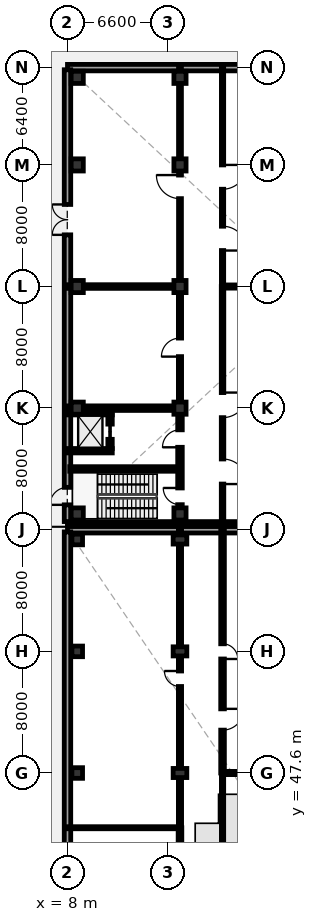
"""IFC4 building model, lengths in metres.
Left out: names, types, materials, properties, quantities, classifications, styles, units other than length and angle.
Written with IfcOpenShell. Run it as: python <this file> out.ifc"""

import sys

from ifc_helpers import new_model, si_unit, direction, frame, frame_2d, origin, origin_2d, place, context, subcontext, project, spatial, rectangle, extrude, element, fill, save


model = new_model("IFC4")
c1 = context("Model", 3, precision=1e-05, world=origin(), true_north=direction((0.0, 1.0)))
c2 = subcontext(c1, "Body", "Model", "MODEL_VIEW")
j1 = project(units=[si_unit("LENGTHUNIT", "METRE"), si_unit("PLANEANGLEUNIT", "RADIAN")], contexts=[c1])
p1 = place(None, origin())
s1 = spatial("IfcSite", under=j1, at=p1, CompositionType="ELEMENT")
p2 = place(p1, origin())
s2 = spatial("IfcBuilding", under=s1, at=p2, CompositionType="ELEMENT")
p3 = place(p2, origin())
s3 = spatial("IfcBuildingStorey", under=s2, at=p3, CompositionType="ELEMENT", Elevation=0.0)
for number, where, z_axis, x_axis in (
    (1, (8.64, 47.6, 0.0), (0.0, 0.0, 1.0), (1.0, 0.0, 0.0)),
    (2, (8.64, 55.6, 0.0), (0.0, 0.0, 1.0), (1.0, 0.0, 0.0)),
    (3, (8.64, 62.96, 0.0), (0.0, 0.0, 1.0), (1.0, 0.0, 0.0)),
):
    element("IfcColumn", number, at=place(p3, frame(where, z_axis=z_axis, x_axis=x_axis)), inside=s3, PredefinedType="COLUMN", context=c2, shape_type="SweptSolid", body=[
        extrude(rectangle(XDim=0.7, YDim=0.7, at=origin_2d()), origin(), (0.0, 0.0, 1.0), 5.4),
    ])
for number, where, z_axis, x_axis in (
    (4, (15.4, 47.6, 0.0), (0.0, 0.0, 1.0), (1.0, 0.0, 0.0)),
    (5, (15.4, 55.6, 0.0), (0.0, 0.0, 1.0), (1.0, 0.0, 0.0)),
    (6, (15.4, 62.96, 0.0), (0.0, 0.0, 1.0), (1.0, 0.0, 0.0)),
):
    element("IfcColumn", number, at=place(p3, frame(where, z_axis=z_axis, x_axis=x_axis)), inside=s3, PredefinedType="COLUMN", context=c2, shape_type="SweptSolid", body=[
        extrude(rectangle(XDim=0.6, YDim=0.9, at=origin_2d()), origin(), (0.0, 0.0, 1.0), 5.4),
    ])
for number, where, z_axis, x_axis in (
    (7, (8.64, 64.64, 0.0), (0.0, 0.0, 1.0), (1.0, 0.0, 0.0)),
    (8, (8.64, 71.6, 0.0), (0.0, 0.0, 1.0), (1.0, 0.0, 0.0)),
    (9, (8.64, 79.6, 0.0), (0.0, 0.0, 1.0), (1.0, 0.0, 0.0)),
    (10, (8.64, 87.6, 0.0), (0.0, 0.0, 1.0), (1.0, 0.0, 0.0)),
    (11, (8.64, 93.36, 0.0), (0.0, 0.0, 1.0), (1.0, 0.0, 0.0)),
    (12, (15.4, 64.64, 0.0), (0.0, 0.0, 1.0), (1.0, 0.0, 0.0)),
    (13, (15.4, 71.6, 0.0), (0.0, 0.0, 1.0), (1.0, 0.0, 0.0)),
    (14, (15.4, 79.6, 0.0), (0.0, 0.0, 1.0), (1.0, 0.0, 0.0)),
    (15, (15.4, 87.6, 0.0), (0.0, 0.0, 1.0), (1.0, 0.0, 0.0)),
    (16, (15.4, 93.36, 0.0), (0.0, 0.0, 1.0), (1.0, 0.0, 0.0)),
):
    element("IfcColumn", number, at=place(p3, frame(where, z_axis=z_axis, x_axis=x_axis)), inside=s3, PredefinedType="COLUMN", context=c2, shape_type="SweptSolid", body=[
        extrude(rectangle(XDim=0.8, YDim=0.8, at=origin_2d()), origin(), (0.0, 0.0, 1.0), 5.4),
    ])
p4 = place(p3, frame((8.0, 63.6, 0.0), z_axis=(0.0, 0.0, 1.0), x_axis=(1.0, 0.0, 0.0)))
e17 = element("IfcWall", 17, at=p4, inside=s3, PredefinedType="SOLIDWALL", context=c2, shape_type="SweptSolid", body=[
    extrude(rectangle(XDim=38.0, YDim=0.425, at=frame_2d((19.0, 0.0))), origin(), (0.0, 0.0, 1.0), 5.14),
])
p5 = place(p3, frame((8.0, 7.74, 0.0), z_axis=(0.0, 0.0, 1.0), x_axis=(0.0, 1.0, 0.0)))
e18 = element("IfcWall", 18, at=p5, inside=s3, PredefinedType="SOLIDWALL", context=c2, shape_type="SweptSolid", body=[
    extrude(rectangle(XDim=55.72, YDim=0.425, at=frame_2d((27.86, 0.0))), origin(), (0.0, 0.0, 1.0), 5.14),
])
p6 = place(p5, frame((1.1, 0.0, 0.0)))
e19 = element("IfcOpeningElement", 19, at=p6, cuts=e18, PredefinedType="OPENING", context=c2, shape_type="SweptSolid", body=[
    extrude(rectangle(XDim=1.15, YDim=2.2, at=frame_2d((0.575, 1.1))), frame((0.0, 0.222, 0.0), z_axis=(0.0, -1.0, 0.0), x_axis=(1.0, 0.0, 0.0)), (0.0, 0.0, 1.0), 0.445),
])
p7 = place(p5, frame((9.46, 0.0, 0.0)))
e20 = element("IfcOpeningElement", 20, at=p7, cuts=e18, PredefinedType="OPENING", context=c2, shape_type="SweptSolid", body=[
    extrude(rectangle(XDim=2.0, YDim=2.5, at=frame_2d((1.0, 1.25))), frame((0.0, 0.222, 0.0), z_axis=(0.0, -1.0, 0.0), x_axis=(1.0, 0.0, 0.0)), (0.0, 0.0, 1.0), 0.445),
])
p8 = place(p3, frame((8.0, 94.0, 0.0), z_axis=(0.0, 0.0, 1.0), x_axis=(1.0, 0.0, 0.0)))
e21 = element("IfcWall", 21, at=p8, inside=s3, PredefinedType="SOLIDWALL", context=c2, shape_type="SweptSolid", body=[
    extrude(rectangle(XDim=32.2, YDim=0.425, at=frame_2d((16.1, 0.0))), origin(), (0.0, 0.0, 1.0), 5.12),
])
p9 = place(p3, frame((40.2, 64.0, 0.0), z_axis=(0.0, 0.0, 1.0), x_axis=(-1.0, 0.0, 0.0)))
e22 = element("IfcWall", 22, at=p9, inside=s3, PredefinedType="SOLIDWALL", context=c2, shape_type="SweptSolid", body=[
    extrude(rectangle(XDim=32.2, YDim=0.275, at=frame_2d((16.1, 0.0))), origin(), (0.0, 0.0, 1.0), 5.12),
])
p10 = place(p3, frame((8.0, 64.14, 0.0), z_axis=(0.0, 0.0, 1.0), x_axis=(0.0, 1.0, 0.0)))
e23 = element("IfcWall", 23, at=p10, inside=s3, PredefinedType="SOLIDWALL", context=c2, shape_type="SweptSolid", body=[
    extrude(rectangle(XDim=29.72, YDim=0.425, at=frame_2d((14.86, 0.0))), origin(), (0.0, 0.0, 1.0), 5.12),
])
p11 = place(p10, frame((1.1, 0.0, 0.0)))
e24 = element("IfcOpeningElement", 24, at=p11, cuts=e23, PredefinedType="OPENING", context=c2, shape_type="SweptSolid", body=[
    extrude(rectangle(XDim=1.15, YDim=2.2, at=frame_2d((0.575, 1.1))), frame((0.0, 0.222, 0.0), z_axis=(0.0, -1.0, 0.0), x_axis=(1.0, 0.0, 0.0)), (0.0, 0.0, 1.0), 0.445),
])
p12 = place(p10, frame((18.86, 0.0, 0.0)))
e25 = element("IfcOpeningElement", 25, at=p12, cuts=e23, PredefinedType="OPENING", context=c2, shape_type="SweptSolid", body=[
    extrude(rectangle(XDim=2.0, YDim=2.5, at=frame_2d((1.0, 1.25))), frame((0.0, 0.222, 0.0), z_axis=(0.0, -1.0, 0.0), x_axis=(1.0, 0.0, 0.0)), (0.0, 0.0, 1.0), 0.445),
])
p13 = place(p3, frame((7.85, 71.6, 0.0), z_axis=(0.0, 0.0, 1.0), x_axis=(1.0, 0.0, 0.0)))
e26 = element("IfcWall", 26, at=p13, inside=s3, PredefinedType="SHEAR", context=c2, shape_type="SweptSolid", body=[
    extrude(rectangle(XDim=7.148, YDim=0.3, at=frame_2d((3.574, 0.0))), origin(), (0.0, 0.0, 1.0), 5.12),
])
p14 = place(p3, frame((15.4, 64.15, 0.0), z_axis=(0.0, 0.0, 1.0), x_axis=(0.0, 1.0, 0.0)))
e27 = element("IfcWall", 27, at=p14, inside=s3, PredefinedType="SHEAR", context=c2, shape_type="SweptSolid", body=[
    extrude(rectangle(XDim=7.048, YDim=0.3, at=frame_2d((3.524, 0.0))), origin(), (0.0, 0.0, 1.0), 5.12),
])
p15 = place(p14, frame((1.1, 0.0, 0.0)))
e28 = element("IfcOpeningElement", 28, at=p15, cuts=e27, PredefinedType="OPENING", context=c2, shape_type="SweptSolid", body=[
    extrude(rectangle(XDim=1.1, YDim=2.15, at=frame_2d((0.55, 1.075))), frame((0.0, 0.16, 0.0), z_axis=(0.0, -1.0, 0.0), x_axis=(1.0, 0.0, 0.0)), (0.0, 0.0, 1.0), 0.32),
])
p16 = place(p14, frame((4.875, 0.0, 0.0)))
e29 = element("IfcOpeningElement", 29, at=p16, cuts=e27, PredefinedType="OPENING", context=c2, shape_type="SweptSolid", body=[
    extrude(rectangle(XDim=1.15, YDim=2.2, at=frame_2d((0.575, 1.1))), frame((0.0, 0.16, 0.0), z_axis=(0.0, -1.0, 0.0), x_axis=(1.0, 0.0, 0.0)), (0.0, 0.0, 1.0), 0.32),
])
p17 = place(p3, frame((8.15, 67.6, 0.0), z_axis=(0.0, 0.0, 1.0), x_axis=(1.0, 0.0, 0.0)))
e30 = element("IfcWall", 30, at=p17, inside=s3, PredefinedType="SHEAR", context=c2, shape_type="SweptSolid", body=[
    extrude(rectangle(XDim=7.1, YDim=0.3, at=frame_2d((3.55, 0.0))), origin(), (0.0, 0.0, 1.0), 5.12),
])
for number, where, z_axis, x_axis in (
    (31, (8.055, 68.8, 0.0), (0.0, 0.0, 1.0), (1.0, 0.0, 0.0)),
    (32, (8.055, 71.3, 0.0), (0.0, 0.0, 1.0), (1.0, 0.0, 0.0)),
):
    element("IfcWall", number, at=place(p3, frame(where, z_axis=z_axis, x_axis=x_axis)), inside=s3, PredefinedType="SHEAR", context=c2, shape_type="SweptSolid", body=[
        extrude(rectangle(XDim=2.89, YDim=0.29, at=frame_2d((1.445, 0.0))), origin(), (0.0, 0.0, 1.0), 5.12),
    ])
p18 = place(p3, frame((10.8, 68.945, 0.0), z_axis=(0.0, 0.0, 1.0), x_axis=(0.0, 1.0, 0.0)))
e33 = element("IfcWall", 33, at=p18, inside=s3, PredefinedType="SHEAR", context=c2, shape_type="SweptSolid", body=[
    extrude(rectangle(XDim=2.21, YDim=0.29, at=frame_2d((1.105, 0.0))), origin(), (0.0, 0.0, 1.0), 5.12),
])
p19 = place(p18, frame((0.605, 0.0, 0.0)))
e34 = element("IfcOpeningElement", 34, at=p19, cuts=e33, PredefinedType="OPENING", context=c2, shape_type="SweptSolid", body=[
    extrude(rectangle(XDim=1.0, YDim=2.15, at=frame_2d((0.5, 1.075))), frame((0.0, 0.155, 0.0), z_axis=(0.0, -1.0, 0.0), x_axis=(1.0, 0.0, 0.0)), (0.0, 0.0, 1.0), 0.31),
])
p20 = place(p3, frame((15.4, 26.4, 0.0), z_axis=(0.0, 0.0, 1.0), x_axis=(0.0, 1.0, 0.0)))
e35 = element("IfcWall", 35, at=p20, inside=s3, PredefinedType="PARTITIONING", context=c2, shape_type="SweptSolid", body=[
    extrude(rectangle(XDim=17.6, YDim=0.24, at=frame_2d((8.8, 0.0))), origin(), (0.0, 0.0, 1.0), 4.29),
])
p21 = place(p20, frame((8.325, 0.0, 0.0)))
e36 = element("IfcOpeningElement", 36, at=p21, cuts=e35, PredefinedType="OPENING", context=c2, shape_type="SweptSolid", body=[
    extrude(rectangle(XDim=0.95, YDim=2.1, at=frame_2d((0.475, 1.05))), frame((0.0, 0.13, 0.0), z_axis=(0.0, -1.0, 0.0), x_axis=(1.0, 0.0, 0.0)), (0.0, 0.0, 1.0), 0.26),
])
p22 = place(p3, frame((15.4, 44.0, 0.0), z_axis=(0.0, 0.0, 1.0), x_axis=(0.0, 1.0, 0.0)))
e37 = element("IfcWall", 37, at=p22, inside=s3, PredefinedType="PARTITIONING", context=c2, shape_type="SweptSolid", body=[
    extrude(rectangle(XDim=19.6, YDim=0.21, at=frame_2d((9.8, 0.0))), origin(), (0.0, 0.0, 1.0), 4.29),
])
p23 = place(p22, frame((9.29, 0.0, 0.0)))
e38 = element("IfcOpeningElement", 38, at=p23, cuts=e37, PredefinedType="OPENING", context=c2, shape_type="SweptSolid", body=[
    extrude(rectangle(XDim=1.02, YDim=2.1, at=frame_2d((0.51, 1.05))), frame((0.0, 0.115, 0.0), z_axis=(0.0, -1.0, 0.0), x_axis=(1.0, 0.0, 0.0)), (0.0, 0.0, 1.0), 0.23),
])
p24 = place(p3, frame((18.2, 47.6, 0.0), z_axis=(0.0, 0.0, 1.0), x_axis=(0.0, -1.0, 0.0)))
e39 = element("IfcWall", 39, at=p24, inside=s3, PredefinedType="PARTITIONING", context=c2, shape_type="SweptSolid", body=[
    extrude(rectangle(XDim=16.0, YDim=0.15, at=frame_2d((8.0, 0.0))), origin(), (0.0, 0.0, 1.0), 5.14),
])
p25 = place(p24, frame((6.18, 0.0, 0.0)))
e40 = element("IfcOpeningElement", 40, at=p25, cuts=e39, PredefinedType="OPENING", context=c2, shape_type="SweptSolid", body=[
    extrude(rectangle(XDim=0.98, YDim=2.1, at=frame_2d((0.49, 1.05))), frame((0.0, 0.085, 0.0), z_axis=(0.0, -1.0, 0.0), x_axis=(1.0, 0.0, 0.0)), (0.0, 0.0, 1.0), 0.17),
])
p26 = place(p24, frame((11.99, 0.0, 0.0)))
e41 = element("IfcOpeningElement", 41, at=p26, cuts=e39, PredefinedType="OPENING", context=c2, shape_type="SweptSolid", body=[
    extrude(rectangle(XDim=0.98, YDim=2.1, at=frame_2d((0.49, 1.05))), frame((0.0, 0.085, 0.0), z_axis=(0.0, -1.0, 0.0), x_axis=(1.0, 0.0, 0.0)), (0.0, 0.0, 1.0), 0.17),
])
p27 = place(p3, frame((18.2, 63.6, 0.0), z_axis=(0.0, 0.0, 1.0), x_axis=(0.0, -1.0, 0.0)))
e42 = element("IfcWall", 42, at=p27, inside=s3, PredefinedType="PARTITIONING", context=c2, shape_type="SweptSolid", body=[
    extrude(rectangle(XDim=16.0, YDim=0.24, at=frame_2d((8.0, 0.0))), origin(), (0.0, 0.0, 1.0), 5.14),
])
p28 = place(p27, frame((7.5, 0.0, 0.0)))
e43 = element("IfcOpeningElement", 43, at=p28, cuts=e42, PredefinedType="OPENING", context=c2, shape_type="SweptSolid", body=[
    extrude(rectangle(XDim=1.0, YDim=2.1, at=frame_2d((0.5, 1.05))), frame((0.0, 0.13, 0.0), z_axis=(0.0, -1.0, 0.0), x_axis=(1.0, 0.0, 0.0)), (0.0, 0.0, 1.0), 0.26),
])
p29 = place(p27, frame((11.78, 0.0, 0.0)))
e44 = element("IfcOpeningElement", 44, at=p29, cuts=e42, PredefinedType="OPENING", context=c2, shape_type="SweptSolid", body=[
    extrude(rectangle(XDim=1.4, YDim=2.25, at=frame_2d((0.7, 1.125))), frame((0.0, 0.13, 0.0), z_axis=(0.0, -1.0, 0.0), x_axis=(1.0, 0.0, 0.0)), (0.0, 0.0, 1.0), 0.26),
])
p30 = place(p3, frame((8.0, 44.0, 0.0), z_axis=(0.0, 0.0, 1.0), x_axis=(1.0, 0.0, 0.0)))
e45 = element("IfcWall", 45, at=p30, inside=s3, PredefinedType="PARTITIONING", context=c2, shape_type="SweptSolid", body=[
    extrude(rectangle(XDim=7.4, YDim=0.135, at=frame_2d((3.7, 0.0))), origin(), (0.0, 0.0, 1.0), 5.14),
])
p31 = place(p3, frame((18.2, 47.6, 0.0), z_axis=(0.0, 0.0, 1.0), x_axis=(1.0, 0.0, 0.0)))
e46 = element("IfcWall", 46, at=p31, inside=s3, PredefinedType="PARTITIONING", context=c2, shape_type="SweptSolid", body=[
    extrude(rectangle(XDim=27.8, YDim=0.21, at=frame_2d((13.9, 0.0))), origin(), (0.0, 0.0, 1.0), 4.29),
])
p32 = place(p3, frame((15.4, 72.002, 0.0), z_axis=(0.0, 0.0, 1.0), x_axis=(0.0, 1.0, 0.0)))
e47 = element("IfcWall", 47, at=p32, inside=s3, PredefinedType="PARTITIONING", context=c2, shape_type="SweptSolid", body=[
    extrude(rectangle(XDim=7.196, YDim=0.21, at=frame_2d((3.598, 0.0))), origin(), (0.0, 0.0, 1.0), 4.27),
])
p33 = place(p32, frame((2.988, 0.0, 0.0)))
e48 = element("IfcOpeningElement", 48, at=p33, cuts=e47, PredefinedType="OPENING", context=c2, shape_type="SweptSolid", body=[
    extrude(rectangle(XDim=1.22, YDim=2.2, at=frame_2d((0.61, 1.1))), frame((0.0, 0.115, 0.0), z_axis=(0.0, -1.0, 0.0), x_axis=(1.0, 0.0, 0.0)), (0.0, 0.0, 1.0), 0.23),
])
p34 = place(p3, frame((15.4, 80.002, 0.0), z_axis=(0.0, 0.0, 1.0), x_axis=(0.0, 1.0, 0.0)))
e49 = element("IfcWall", 49, at=p34, inside=s3, PredefinedType="PARTITIONING", context=c2, shape_type="SweptSolid", body=[
    extrude(rectangle(XDim=13.998, YDim=0.19, at=frame_2d((6.999, 0.0))), origin(), (0.0, 0.0, 1.0), 4.27),
])
p35 = place(p34, frame((5.38, 0.0, 0.0)))
e50 = element("IfcOpeningElement", 50, at=p35, cuts=e49, PredefinedType="OPENING", context=c2, shape_type="SweptSolid", body=[
    extrude(rectangle(XDim=1.55, YDim=2.25, at=frame_2d((0.775, 1.125))), frame((0.0, 0.105, 0.0), z_axis=(0.0, -1.0, 0.0), x_axis=(1.0, 0.0, 0.0)), (0.0, 0.0, 1.0), 0.21),
])
p36 = place(p3, frame((18.2, 79.6, 0.0), z_axis=(0.0, 0.0, 1.0), x_axis=(0.0, -1.0, 0.0)))
e51 = element("IfcWall", 51, at=p36, inside=s3, PredefinedType="PARTITIONING", context=c2, shape_type="SweptSolid", body=[
    extrude(rectangle(XDim=15.6, YDim=0.165, at=frame_2d((7.8, 0.0))), origin(), (0.0, 0.0, 1.0), 5.12),
])
p37 = place(p36, frame((6.975, 0.0, 0.0)))
e52 = element("IfcOpeningElement", 52, at=p37, cuts=e51, PredefinedType="OPENING", context=c2, shape_type="SweptSolid", body=[
    extrude(rectangle(XDim=1.65, YDim=2.3, at=frame_2d((0.825, 1.15))), frame((0.0, 0.093, 0.0), z_axis=(0.0, -1.0, 0.0), x_axis=(1.0, 0.0, 0.0)), (0.0, 0.0, 1.0), 0.185),
])
p38 = place(p36, frame((11.343, 0.0, 0.0)))
e53 = element("IfcOpeningElement", 53, at=p38, cuts=e51, PredefinedType="OPENING", context=c2, shape_type="SweptSolid", body=[
    extrude(rectangle(XDim=1.65, YDim=2.3, at=frame_2d((0.825, 1.15))), frame((0.0, 0.093, 0.0), z_axis=(0.0, -1.0, 0.0), x_axis=(1.0, 0.0, 0.0)), (0.0, 0.0, 1.0), 0.185),
])
p39 = place(p3, frame((18.2, 94.0, 0.0), z_axis=(0.0, 0.0, 1.0), x_axis=(0.0, -1.0, 0.0)))
e54 = element("IfcWall", 54, at=p39, inside=s3, PredefinedType="PARTITIONING", context=c2, shape_type="SweptSolid", body=[
    extrude(rectangle(XDim=14.4, YDim=0.15, at=frame_2d((7.2, 0.0))), origin(), (0.0, 0.0, 1.0), 5.12),
])
p40 = place(p39, frame((6.4, 0.0, 0.0)))
e55 = element("IfcOpeningElement", 55, at=p40, cuts=e54, PredefinedType="OPENING", context=c2, shape_type="SweptSolid", body=[
    extrude(rectangle(XDim=1.6, YDim=2.3, at=frame_2d((0.8, 1.15))), frame((0.0, 0.085, 0.0), z_axis=(0.0, -1.0, 0.0), x_axis=(1.0, 0.0, 0.0)), (0.0, 0.0, 1.0), 0.17),
])
p41 = place(p39, frame((10.432, 0.0, 0.0)))
e56 = element("IfcOpeningElement", 56, at=p41, cuts=e54, PredefinedType="OPENING", context=c2, shape_type="SweptSolid", body=[
    extrude(rectangle(XDim=1.6, YDim=2.3, at=frame_2d((0.8, 1.15))), frame((0.0, 0.085, 0.0), z_axis=(0.0, -1.0, 0.0), x_axis=(1.0, 0.0, 0.0)), (0.0, 0.0, 1.0), 0.17),
])
p42 = place(p3, frame((8.0, 79.6, 0.0), z_axis=(0.0, 0.0, 1.0), x_axis=(1.0, 0.0, 0.0)))
e57 = element("IfcWall", 57, at=p42, inside=s3, PredefinedType="PARTITIONING", context=c2, shape_type="SweptSolid", body=[
    extrude(rectangle(XDim=6.998, YDim=0.24, at=frame_2d((3.499, 0.0))), origin(), (0.0, 0.0, 1.0), 4.47),
])
p43 = place(p3, frame((18.2, 79.6, 0.0), z_axis=(0.0, 0.0, 1.0), x_axis=(1.0, 0.0, 0.0)))
e58 = element("IfcWall", 58, at=p43, inside=s3, PredefinedType="PARTITIONING", context=c2, shape_type="SweptSolid", body=[
    extrude(rectangle(XDim=22.0, YDim=0.21, at=frame_2d((11.0, 0.0))), origin(), (0.0, 0.0, 1.0), 4.47),
])
p44 = place(p11, origin())
e59 = element("IfcDoor", 59, at=p44, inside=s3, OperationType="SINGLE_SWING_LEFT", PredefinedType="DOOR", context=c2, shape_type="SweptSolid", body=[
    extrude(rectangle(XDim=1.15, YDim=2.2, at=frame_2d((0.575, 1.1))), frame((0.0, 0.025, 0.0), z_axis=(0.0, -1.0, 0.0), x_axis=(1.0, 0.0, 0.0)), (0.0, 0.0, 1.0), 0.05),
])
fill(e24, e59)
p45 = place(p12, origin())
e60 = element("IfcDoor", 60, at=p45, inside=s3, OperationType="DOUBLE_SWING_LEFT", PredefinedType="DOOR", context=c2, shape_type="SweptSolid", body=[
    extrude(rectangle(XDim=2.0, YDim=2.5, at=frame_2d((1.0, 1.25))), frame((0.0, 0.025, 0.0), z_axis=(0.0, -1.0, 0.0), x_axis=(1.0, 0.0, 0.0)), (0.0, 0.0, 1.0), 0.05),
])
fill(e25, e60)
p46 = place(p15, origin())
e61 = element("IfcDoor", 61, at=p46, inside=s3, OperationType="SINGLE_SWING_RIGHT", PredefinedType="DOOR", context=c2, shape_type="SweptSolid", body=[
    extrude(rectangle(XDim=1.1, YDim=2.15, at=frame_2d((0.55, 1.075))), frame((0.0, 0.025, 0.0), z_axis=(0.0, -1.0, 0.0), x_axis=(1.0, 0.0, 0.0)), (0.0, 0.0, 1.0), 0.05),
])
fill(e28, e61)
p47 = place(p16, origin())
e62 = element("IfcDoor", 62, at=p47, inside=s3, OperationType="SINGLE_SWING_LEFT", PredefinedType="DOOR", context=c2, shape_type="SweptSolid", body=[
    extrude(rectangle(XDim=1.15, YDim=2.2, at=frame_2d((0.575, 1.1))), frame((0.0, 0.025, 0.0), z_axis=(0.0, -1.0, 0.0), x_axis=(1.0, 0.0, 0.0)), (0.0, 0.0, 1.0), 0.05),
])
fill(e29, e62)
p48 = place(p19, origin())
e63 = element("IfcDoor", 63, at=p48, inside=s3, OperationType="SLIDING_TO_LEFT", PredefinedType="DOOR", context=c2, shape_type="SweptSolid", body=[
    extrude(rectangle(XDim=1.0, YDim=2.15, at=frame_2d((0.5, 1.075))), frame((0.0, 0.025, 0.0), z_axis=(0.0, -1.0, 0.0), x_axis=(1.0, 0.0, 0.0)), (0.0, 0.0, 1.0), 0.05),
])
fill(e34, e63)
p49 = place(p23, origin())
e64 = element("IfcDoor", 64, at=p49, inside=s3, OperationType="SINGLE_SWING_RIGHT", PredefinedType="DOOR", context=c2, shape_type="SweptSolid", body=[
    extrude(rectangle(XDim=1.02, YDim=2.1, at=frame_2d((0.51, 1.05))), frame((0.0, 0.025, 0.0), z_axis=(0.0, -1.0, 0.0), x_axis=(1.0, 0.0, 0.0)), (0.0, 0.0, 1.0), 0.05),
])
fill(e38, e64)
p50 = place(p28, origin())
e65 = element("IfcDoor", 65, at=p50, inside=s3, OperationType="SINGLE_SWING_RIGHT", PredefinedType="DOOR", context=c2, shape_type="SweptSolid", body=[
    extrude(rectangle(XDim=1.0, YDim=2.1, at=frame_2d((0.5, 1.05))), frame((0.0, 0.025, 0.0), z_axis=(0.0, -1.0, 0.0), x_axis=(1.0, 0.0, 0.0)), (0.0, 0.0, 1.0), 0.05),
])
fill(e43, e65)
p51 = place(p29, origin())
e66 = element("IfcDoor", 66, at=p51, inside=s3, OperationType="SINGLE_SWING_LEFT", PredefinedType="DOOR", context=c2, shape_type="SweptSolid", body=[
    extrude(rectangle(XDim=1.4, YDim=2.25, at=frame_2d((0.7, 1.125))), frame((0.0, 0.025, 0.0), z_axis=(0.0, -1.0, 0.0), x_axis=(1.0, 0.0, 0.0)), (0.0, 0.0, 1.0), 0.05),
])
fill(e44, e66)
p52 = place(p33, origin())
e67 = element("IfcDoor", 67, at=p52, inside=s3, OperationType="SINGLE_SWING_LEFT", PredefinedType="DOOR", context=c2, shape_type="SweptSolid", body=[
    extrude(rectangle(XDim=1.22, YDim=2.2, at=frame_2d((0.61, 1.1))), frame((0.0, 0.025, 0.0), z_axis=(0.0, -1.0, 0.0), x_axis=(1.0, 0.0, 0.0)), (0.0, 0.0, 1.0), 0.05),
])
fill(e48, e67)
p53 = place(p35, origin())
e68 = element("IfcDoor", 68, at=p53, inside=s3, OperationType="SINGLE_SWING_RIGHT", PredefinedType="DOOR", context=c2, shape_type="SweptSolid", body=[
    extrude(rectangle(XDim=1.55, YDim=2.25, at=frame_2d((0.775, 1.125))), frame((0.0, 0.025, 0.0), z_axis=(0.0, -1.0, 0.0), x_axis=(1.0, 0.0, 0.0)), (0.0, 0.0, 1.0), 0.05),
])
fill(e50, e68)
p54 = place(p37, origin())
e69 = element("IfcDoor", 69, at=p54, inside=s3, OperationType="SINGLE_SWING_LEFT", PredefinedType="DOOR", context=c2, shape_type="SweptSolid", body=[
    extrude(rectangle(XDim=1.65, YDim=2.3, at=frame_2d((0.825, 1.15))), frame((0.0, 0.025, 0.0), z_axis=(0.0, -1.0, 0.0), x_axis=(1.0, 0.0, 0.0)), (0.0, 0.0, 1.0), 0.05),
])
fill(e52, e69)
p55 = place(p38, origin())
e70 = element("IfcDoor", 70, at=p55, inside=s3, OperationType="SINGLE_SWING_RIGHT", PredefinedType="DOOR", context=c2, shape_type="SweptSolid", body=[
    extrude(rectangle(XDim=1.65, YDim=2.3, at=frame_2d((0.825, 1.15))), frame((0.0, 0.025, 0.0), z_axis=(0.0, -1.0, 0.0), x_axis=(1.0, 0.0, 0.0)), (0.0, 0.0, 1.0), 0.05),
])
fill(e53, e70)
p56 = place(p40, origin())
e71 = element("IfcDoor", 71, at=p56, inside=s3, OperationType="SINGLE_SWING_LEFT", PredefinedType="DOOR", context=c2, shape_type="SweptSolid", body=[
    extrude(rectangle(XDim=1.6, YDim=2.3, at=frame_2d((0.8, 1.15))), frame((0.0, 0.025, 0.0), z_axis=(0.0, -1.0, 0.0), x_axis=(1.0, 0.0, 0.0)), (0.0, 0.0, 1.0), 0.05),
])
fill(e55, e71)
p57 = place(p41, origin())
e72 = element("IfcDoor", 72, at=p57, inside=s3, OperationType="SINGLE_SWING_RIGHT", PredefinedType="DOOR", context=c2, shape_type="SweptSolid", body=[
    extrude(rectangle(XDim=1.6, YDim=2.3, at=frame_2d((0.8, 1.15))), frame((0.0, 0.025, 0.0), z_axis=(0.0, -1.0, 0.0), x_axis=(1.0, 0.0, 0.0)), (0.0, 0.0, 1.0), 0.05),
])
fill(e56, e72)
save(model, sys.argv[1])
